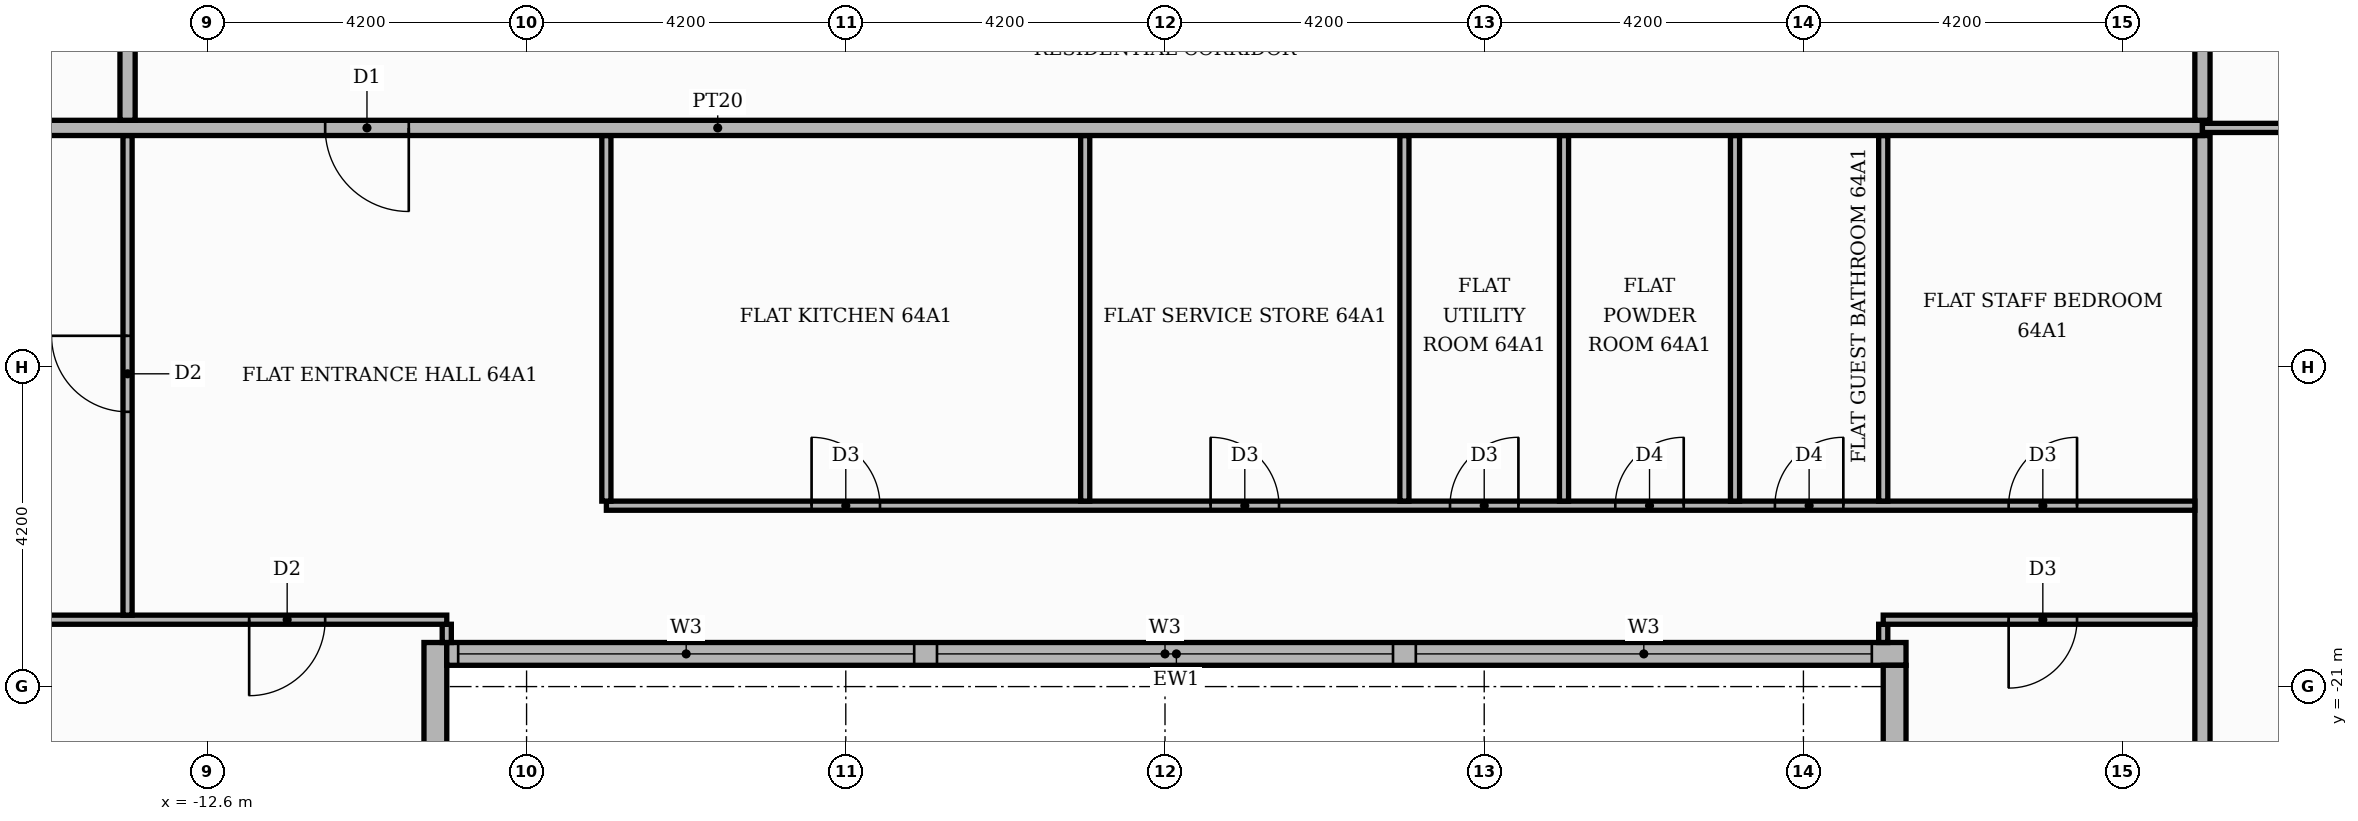
"""IFC4 building model, lengths in metres.
Left out: names, types, materials, properties, quantities, classifications, styles, units other than length and angle.
Written with IfcOpenShell. Run it as: python <this file> out.ifc"""

import sys

from ifc_helpers import new_model, si_unit, direction, frame, frame_2d, origin, place, context, subcontext, project, spatial, rectangle, extrude, element, fill, save


model = new_model("IFC4")
c1 = context("Model", 3, precision=1e-05, world=origin(), true_north=direction((0.0, 1.0)))
c2 = subcontext(c1, "Body", "Model", "MODEL_VIEW")
j1 = project(units=[si_unit("LENGTHUNIT", "METRE"), si_unit("PLANEANGLEUNIT", "RADIAN")], contexts=[c1])
p1 = place(None, origin())
s1 = spatial("IfcSite", under=j1, at=p1, CompositionType="ELEMENT")
p2 = place(p1, origin())
s2 = spatial("IfcBuilding", under=s1, at=p2, CompositionType="ELEMENT")
p3 = place(p2, frame((0.0, 0.0, 267.9)))
s3 = spatial("IfcBuildingStorey", under=s2, at=p3, CompositionType="ELEMENT", Elevation=267.9)
p4 = place(p3, frame((-9.6, -25.42, 0.0), z_axis=(0.0, 0.0, 1.0), x_axis=(0.0, 1.0, 0.0)))
e1 = element("IfcWall", 1, at=p4, inside=s3, PredefinedType="STANDARD", context=c2, shape_type="SweptSolid", body=[
    extrude(rectangle(XDim=5.0, YDim=0.3, at=frame_2d((2.5, 0.0))), origin(), (0.0, 0.0, 1.0), 3.48),
])
p5 = place(p4, frame((1.42, 0.0, 0.9)))
e2 = element("IfcOpeningElement", 2, at=p5, cuts=e1, PredefinedType="OPENING", context=c2, shape_type="SweptSolid", body=[
    extrude(rectangle(XDim=1.8, YDim=2.1, at=frame_2d((0.9, 1.05))), frame((0.0, 0.16, 0.0), z_axis=(0.0, -1.0, 0.0), x_axis=(1.0, 0.0, 0.0)), (0.0, 0.0, 1.0), 0.32),
])
p6 = place(p3, frame((-9.45, -20.57, 0.0), z_axis=(0.0, 0.0, 1.0), x_axis=(1.0, 0.0, 0.0)))
e3 = element("IfcWall", 3, at=p6, inside=s3, PredefinedType="STANDARD", context=c2, shape_type="SweptSolid", body=[
    extrude(rectangle(XDim=19.2, YDim=0.3, at=frame_2d((9.6, 0.0))), origin(), (0.0, 0.0, 1.0), 3.48),
])
p7 = place(p6, frame((0.15, 0.0, 0.9)))
e4 = element("IfcOpeningElement", 4, at=p7, cuts=e3, PredefinedType="OPENING", context=c2, shape_type="SweptSolid", body=[
    extrude(rectangle(XDim=6.0, YDim=2.1, at=frame_2d((3.0, 1.05))), frame((0.0, 0.16, 0.0), z_axis=(0.0, -1.0, 0.0), x_axis=(1.0, 0.0, 0.0)), (0.0, 0.0, 1.0), 0.32),
])
p8 = place(p6, frame((6.45, 0.0, 0.9)))
e5 = element("IfcOpeningElement", 5, at=p8, cuts=e3, PredefinedType="OPENING", context=c2, shape_type="SweptSolid", body=[
    extrude(rectangle(XDim=6.0, YDim=2.1, at=frame_2d((3.0, 1.05))), frame((0.0, 0.16, 0.0), z_axis=(0.0, -1.0, 0.0), x_axis=(1.0, 0.0, 0.0)), (0.0, 0.0, 1.0), 0.32),
])
p9 = place(p6, frame((12.75, 0.0, 0.9)))
e6 = element("IfcOpeningElement", 6, at=p9, cuts=e3, PredefinedType="OPENING", context=c2, shape_type="SweptSolid", body=[
    extrude(rectangle(XDim=6.0, YDim=2.1, at=frame_2d((3.0, 1.05))), frame((0.0, 0.16, 0.0), z_axis=(0.0, -1.0, 0.0), x_axis=(1.0, 0.0, 0.0)), (0.0, 0.0, 1.0), 0.32),
])
p10 = place(p3, frame((9.6, -20.72, 0.0), z_axis=(0.0, 0.0, 1.0), x_axis=(0.0, -1.0, 0.0)))
e7 = element("IfcWall", 7, at=p10, inside=s3, PredefinedType="STANDARD", context=c2, shape_type="SweptSolid", body=[
    extrude(rectangle(XDim=5.0, YDim=0.3, at=frame_2d((2.5, 0.0))), origin(), (0.0, 0.0, 1.0), 3.48),
])
p11 = place(p10, frame((1.48, 0.0, 0.9)))
e8 = element("IfcOpeningElement", 8, at=p11, cuts=e7, PredefinedType="OPENING", context=c2, shape_type="SweptSolid", body=[
    extrude(rectangle(XDim=1.8, YDim=2.1, at=frame_2d((0.9, 1.05))), frame((0.0, 0.16, 0.0), z_axis=(0.0, -1.0, 0.0), x_axis=(1.0, 0.0, 0.0)), (0.0, 0.0, 1.0), 0.32),
])
p12 = place(p3, frame((13.65, -25.42, 0.0), z_axis=(0.0, 0.0, 1.0), x_axis=(0.0, 1.0, 0.0)))
e9 = element("IfcWall", 9, at=p12, inside=s3, PredefinedType="PARTITIONING", context=c2, shape_type="SweptSolid", body=[
    extrude(rectangle(XDim=11.67, YDim=0.2, at=frame_2d((5.835, 0.0))), origin(), (0.0, 0.0, 1.0), 3.48),
])
for number, where, z_axis, x_axis in (
    (10, (-9.45, -20.42, 0.0), (0.0, 0.0, 1.0), (0.0, 1.0, 0.0)),
    (11, (9.45, -20.42, 0.0), (0.0, 0.0, 1.0), (0.0, 1.0, 0.0)),
):
    element("IfcWall", number, at=place(p3, frame(where, z_axis=z_axis, x_axis=x_axis)), inside=s3, PredefinedType="PARTITIONING", context=c2, shape_type="SweptSolid", body=[
        extrude(rectangle(XDim=0.24, YDim=0.12, at=frame_2d((0.12, 0.0))), origin(), (0.0, 0.0, 1.0), 3.48),
    ])
p13 = place(p3, frame((-20.719, -20.12, 0.0), z_axis=(0.0, 0.0, 1.0), x_axis=(1.0, 0.0, 0.0)))
e12 = element("IfcWall", 12, at=p13, inside=s3, PredefinedType="PARTITIONING", context=c2, shape_type="SweptSolid", body=[
    extrude(rectangle(XDim=11.269, YDim=0.12, at=frame_2d((5.635, 0.0))), origin(), (0.0, 0.0, 1.0), 3.48),
])
p14 = place(p13, frame((8.669, 0.0, 0.0)))
e13 = element("IfcOpeningElement", 13, at=p14, cuts=e12, PredefinedType="OPENING", context=c2, shape_type="SweptSolid", body=[
    extrude(rectangle(XDim=1.0, YDim=2.1, at=frame_2d((0.5, 1.05))), frame((0.0, 0.07, 0.0), z_axis=(0.0, -1.0, 0.0), x_axis=(1.0, 0.0, 0.0)), (0.0, 0.0, 1.0), 0.14),
])
p15 = place(p3, frame((9.45, -20.12, 0.0), z_axis=(0.0, 0.0, 1.0), x_axis=(1.0, 0.0, 0.0)))
e14 = element("IfcWall", 14, at=p15, inside=s3, PredefinedType="PARTITIONING", context=c2, shape_type="SweptSolid", body=[
    extrude(rectangle(XDim=4.1, YDim=0.12, at=frame_2d((2.05, 0.0))), origin(), (0.0, 0.0, 1.0), 3.48),
])
p16 = place(p15, frame((1.65, 0.0, 0.0)))
e15 = element("IfcOpeningElement", 15, at=p16, cuts=e14, PredefinedType="OPENING", context=c2, shape_type="SweptSolid", body=[
    extrude(rectangle(XDim=0.9, YDim=2.1, at=frame_2d((0.45, 1.05))), frame((0.0, 0.07, 0.0), z_axis=(0.0, -1.0, 0.0), x_axis=(1.0, 0.0, 0.0)), (0.0, 0.0, 1.0), 0.14),
])
p17 = place(p3, frame((-13.65, -20.06, 0.0), z_axis=(0.0, 0.0, 1.0), x_axis=(0.0, 1.0, 0.0)))
e16 = element("IfcWall", 16, at=p17, inside=s3, PredefinedType="PARTITIONING", context=c2, shape_type="SweptSolid", body=[
    extrude(rectangle(XDim=6.31, YDim=0.12, at=frame_2d((3.155, 0.0))), origin(), (0.0, 0.0, 1.0), 3.48),
])
p18 = place(p17, frame((2.675, 0.0, 0.0)))
e17 = element("IfcOpeningElement", 17, at=p18, cuts=e16, PredefinedType="OPENING", context=c2, shape_type="SweptSolid", body=[
    extrude(rectangle(XDim=1.0, YDim=2.1, at=frame_2d((0.5, 1.05))), frame((0.0, 0.07, 0.0), z_axis=(0.0, -1.0, 0.0), x_axis=(1.0, 0.0, 0.0)), (0.0, 0.0, 1.0), 0.14),
])
p19 = place(p3, frame((-7.35, -18.62, 0.0), z_axis=(0.0, 0.0, 1.0), x_axis=(1.0, 0.0, 0.0)))
e18 = element("IfcWall", 18, at=p19, inside=s3, PredefinedType="PARTITIONING", context=c2, shape_type="SweptSolid", body=[
    extrude(rectangle(XDim=20.9, YDim=0.12, at=frame_2d((10.45, 0.0))), origin(), (0.0, 0.0, 1.0), 3.48),
])
p20 = place(p19, frame((2.7, 0.0, 0.0)))
e19 = element("IfcOpeningElement", 19, at=p20, cuts=e18, PredefinedType="OPENING", context=c2, shape_type="SweptSolid", body=[
    extrude(rectangle(XDim=0.9, YDim=2.1, at=frame_2d((0.45, 1.05))), frame((0.0, 0.07, 0.0), z_axis=(0.0, -1.0, 0.0), x_axis=(1.0, 0.0, 0.0)), (0.0, 0.0, 1.0), 0.14),
])
p21 = place(p19, frame((7.95, 0.0, 0.0)))
e20 = element("IfcOpeningElement", 20, at=p21, cuts=e18, PredefinedType="OPENING", context=c2, shape_type="SweptSolid", body=[
    extrude(rectangle(XDim=0.9, YDim=2.1, at=frame_2d((0.45, 1.05))), frame((0.0, 0.07, 0.0), z_axis=(0.0, -1.0, 0.0), x_axis=(1.0, 0.0, 0.0)), (0.0, 0.0, 1.0), 0.14),
])
p22 = place(p19, frame((11.1, 0.0, 0.0)))
e21 = element("IfcOpeningElement", 21, at=p22, cuts=e18, PredefinedType="OPENING", context=c2, shape_type="SweptSolid", body=[
    extrude(rectangle(XDim=0.9, YDim=2.1, at=frame_2d((0.45, 1.05))), frame((0.0, 0.07, 0.0), z_axis=(0.0, -1.0, 0.0), x_axis=(1.0, 0.0, 0.0)), (0.0, 0.0, 1.0), 0.14),
])
p23 = place(p19, frame((13.275, 0.0, 0.0)))
e22 = element("IfcOpeningElement", 22, at=p23, cuts=e18, PredefinedType="OPENING", context=c2, shape_type="SweptSolid", body=[
    extrude(rectangle(XDim=0.9, YDim=2.1, at=frame_2d((0.45, 1.05))), frame((0.0, 0.07, 0.0), z_axis=(0.0, -1.0, 0.0), x_axis=(1.0, 0.0, 0.0)), (0.0, 0.0, 1.0), 0.14),
])
p24 = place(p19, frame((15.375, 0.0, 0.0)))
e23 = element("IfcOpeningElement", 23, at=p24, cuts=e18, PredefinedType="OPENING", context=c2, shape_type="SweptSolid", body=[
    extrude(rectangle(XDim=0.9, YDim=2.1, at=frame_2d((0.45, 1.05))), frame((0.0, 0.07, 0.0), z_axis=(0.0, -1.0, 0.0), x_axis=(1.0, 0.0, 0.0)), (0.0, 0.0, 1.0), 0.14),
])
p25 = place(p19, frame((18.45, 0.0, 0.0)))
e24 = element("IfcOpeningElement", 24, at=p25, cuts=e18, PredefinedType="OPENING", context=c2, shape_type="SweptSolid", body=[
    extrude(rectangle(XDim=0.9, YDim=2.1, at=frame_2d((0.45, 1.05))), frame((0.0, 0.07, 0.0), z_axis=(0.0, -1.0, 0.0), x_axis=(1.0, 0.0, 0.0)), (0.0, 0.0, 1.0), 0.14),
])
for number, where, z_axis, x_axis in (
    (25, (-7.35, -18.56, 0.0), (0.0, 0.0, 1.0), (0.0, 1.0, 0.0)),
    (26, (-1.05, -18.56, 0.0), (0.0, 0.0, 1.0), (0.0, 1.0, 0.0)),
    (27, (3.15, -18.56, 0.0), (0.0, 0.0, 1.0), (0.0, 1.0, 0.0)),
    (28, (5.25, -18.56, 0.0), (0.0, 0.0, 1.0), (0.0, 1.0, 0.0)),
    (29, (7.5, -18.56, 0.0), (0.0, 0.0, 1.0), (0.0, 1.0, 0.0)),
    (30, (9.45, -18.56, 0.0), (0.0, 0.0, 1.0), (0.0, 1.0, 0.0)),
):
    element("IfcWall", number, at=place(p3, frame(where, z_axis=z_axis, x_axis=x_axis)), inside=s3, PredefinedType="PARTITIONING", context=c2, shape_type="SweptSolid", body=[
        extrude(rectangle(XDim=4.81, YDim=0.12, at=frame_2d((2.405, 0.0))), origin(), (0.0, 0.0, 1.0), 3.48),
    ])
p26 = place(p3, frame((-25.42, -13.65, 0.0), z_axis=(0.0, 0.0, 1.0), x_axis=(1.0, 0.0, 0.0)))
e31 = element("IfcWall", 31, at=p26, inside=s3, PredefinedType="PARTITIONING", context=c2, shape_type="SweptSolid", body=[
    extrude(rectangle(XDim=39.07, YDim=0.2, at=frame_2d((19.535, 0.0))), origin(), (0.0, 0.0, 1.0), 3.48),
])
p27 = place(p26, frame((14.37, 0.0, 0.0)))
e32 = element("IfcOpeningElement", 32, at=p27, cuts=e31, PredefinedType="OPENING", context=c2, shape_type="SweptSolid", body=[
    extrude(rectangle(XDim=1.1, YDim=2.4, at=frame_2d((0.55, 1.2))), frame((0.0, 0.11, 0.0), z_axis=(0.0, -1.0, 0.0), x_axis=(1.0, 0.0, 0.0)), (0.0, 0.0, 1.0), 0.22),
])
p28 = place(p3, frame((13.65, -13.65, 0.0), z_axis=(0.0, 0.0, 1.0), x_axis=(1.0, 0.0, 0.0)))
e33 = element("IfcWall", 33, at=p28, inside=s3, PredefinedType="PARTITIONING", context=c2, shape_type="SweptSolid", body=[
    extrude(rectangle(XDim=6.17, YDim=0.12, at=frame_2d((3.085, 0.0))), origin(), (0.0, 0.0, 1.0), 3.48),
])
p29 = place(p28, frame((2.635, 0.0, 0.0)))
e34 = element("IfcOpeningElement", 34, at=p29, cuts=e33, PredefinedType="OPENING", context=c2, shape_type="SweptSolid", body=[
    extrude(rectangle(XDim=0.9, YDim=2.1, at=frame_2d((0.45, 1.05))), frame((0.0, 0.07, 0.0), z_axis=(0.0, -1.0, 0.0), x_axis=(1.0, 0.0, 0.0)), (0.0, 0.0, 1.0), 0.14),
])
for number, where, z_axis, x_axis in (
    (35, (-13.65, -13.55, 0.0), (0.0, 0.0, 1.0), (0.0, 1.0, 0.0)),
    (36, (13.65, -13.55, 0.0), (0.0, 0.0, 1.0), (0.0, 1.0, 0.0)),
):
    element("IfcWall", number, at=place(p3, frame(where, z_axis=z_axis, x_axis=x_axis)), inside=s3, PredefinedType="PARTITIONING", context=c2, shape_type="SweptSolid", body=[
        extrude(rectangle(XDim=2.45, YDim=0.2, at=frame_2d((1.225, 0.0))), origin(), (0.0, 0.0, 1.0), 3.48),
    ])
p30 = place(p7, origin())
e37 = element("IfcWindow", 37, at=p30, inside=s3, PartitioningType="SINGLE_PANEL", PredefinedType="WINDOW", context=c2, shape_type="SweptSolid", body=[
    extrude(rectangle(XDim=6.0, YDim=2.1, at=frame_2d((3.0, 1.05))), frame((0.0, 0.03, 0.0), z_axis=(0.0, -1.0, 0.0), x_axis=(1.0, 0.0, 0.0)), (0.0, 0.0, 1.0), 0.06),
])
fill(e4, e37)
p31 = place(p8, origin())
e38 = element("IfcWindow", 38, at=p31, inside=s3, PartitioningType="SINGLE_PANEL", PredefinedType="WINDOW", context=c2, shape_type="SweptSolid", body=[
    extrude(rectangle(XDim=6.0, YDim=2.1, at=frame_2d((3.0, 1.05))), frame((0.0, 0.03, 0.0), z_axis=(0.0, -1.0, 0.0), x_axis=(1.0, 0.0, 0.0)), (0.0, 0.0, 1.0), 0.06),
])
fill(e5, e38)
p32 = place(p9, origin())
e39 = element("IfcWindow", 39, at=p32, inside=s3, PartitioningType="SINGLE_PANEL", PredefinedType="WINDOW", context=c2, shape_type="SweptSolid", body=[
    extrude(rectangle(XDim=6.0, YDim=2.1, at=frame_2d((3.0, 1.05))), frame((0.0, 0.03, 0.0), z_axis=(0.0, -1.0, 0.0), x_axis=(1.0, 0.0, 0.0)), (0.0, 0.0, 1.0), 0.06),
])
fill(e6, e39)
p33 = place(p27, frame((1.1, 0.0, 0.0), z_axis=(0.0, 0.0, 1.0), x_axis=(-1.0, 0.0, 0.0)))
e40 = element("IfcDoor", 40, at=p33, inside=s3, OperationType="SINGLE_SWING_RIGHT", PredefinedType="DOOR", context=c2, shape_type="SweptSolid", body=[
    extrude(rectangle(XDim=1.1, YDim=2.4, at=frame_2d((0.55, 1.2))), frame((0.0, 0.025, 0.0), z_axis=(0.0, -1.0, 0.0), x_axis=(1.0, 0.0, 0.0)), (0.0, 0.0, 1.0), 0.05),
])
fill(e32, e40)
p34 = place(p18, origin())
e41 = element("IfcDoor", 41, at=p34, inside=s3, OperationType="SINGLE_SWING_RIGHT", PredefinedType="DOOR", context=c2, shape_type="SweptSolid", body=[
    extrude(rectangle(XDim=1.0, YDim=2.1, at=frame_2d((0.5, 1.05))), frame((0.0, 0.025, 0.0), z_axis=(0.0, -1.0, 0.0), x_axis=(1.0, 0.0, 0.0)), (0.0, 0.0, 1.0), 0.05),
])
fill(e17, e41)
p35 = place(p20, origin())
e42 = element("IfcDoor", 42, at=p35, inside=s3, OperationType="SINGLE_SWING_LEFT", PredefinedType="DOOR", context=c2, shape_type="SweptSolid", body=[
    extrude(rectangle(XDim=0.9, YDim=2.1, at=frame_2d((0.45, 1.05))), frame((0.0, 0.025, 0.0), z_axis=(0.0, -1.0, 0.0), x_axis=(1.0, 0.0, 0.0)), (0.0, 0.0, 1.0), 0.05),
])
fill(e19, e42)
p36 = place(p21, origin())
e43 = element("IfcDoor", 43, at=p36, inside=s3, OperationType="SINGLE_SWING_LEFT", PredefinedType="DOOR", context=c2, shape_type="SweptSolid", body=[
    extrude(rectangle(XDim=0.9, YDim=2.1, at=frame_2d((0.45, 1.05))), frame((0.0, 0.025, 0.0), z_axis=(0.0, -1.0, 0.0), x_axis=(1.0, 0.0, 0.0)), (0.0, 0.0, 1.0), 0.05),
])
fill(e20, e43)
p37 = place(p22, origin())
e44 = element("IfcDoor", 44, at=p37, inside=s3, OperationType="SINGLE_SWING_RIGHT", PredefinedType="DOOR", context=c2, shape_type="SweptSolid", body=[
    extrude(rectangle(XDim=0.9, YDim=2.1, at=frame_2d((0.45, 1.05))), frame((0.0, 0.025, 0.0), z_axis=(0.0, -1.0, 0.0), x_axis=(1.0, 0.0, 0.0)), (0.0, 0.0, 1.0), 0.05),
])
fill(e21, e44)
p38 = place(p23, origin())
e45 = element("IfcDoor", 45, at=p38, inside=s3, OperationType="SINGLE_SWING_RIGHT", PredefinedType="DOOR", context=c2, shape_type="SweptSolid", body=[
    extrude(rectangle(XDim=0.9, YDim=2.1, at=frame_2d((0.45, 1.05))), frame((0.0, 0.025, 0.0), z_axis=(0.0, -1.0, 0.0), x_axis=(1.0, 0.0, 0.0)), (0.0, 0.0, 1.0), 0.05),
])
fill(e22, e45)
p39 = place(p24, origin())
e46 = element("IfcDoor", 46, at=p39, inside=s3, OperationType="SINGLE_SWING_RIGHT", PredefinedType="DOOR", context=c2, shape_type="SweptSolid", body=[
    extrude(rectangle(XDim=0.9, YDim=2.1, at=frame_2d((0.45, 1.05))), frame((0.0, 0.025, 0.0), z_axis=(0.0, -1.0, 0.0), x_axis=(1.0, 0.0, 0.0)), (0.0, 0.0, 1.0), 0.05),
])
fill(e23, e46)
p40 = place(p25, origin())
e47 = element("IfcDoor", 47, at=p40, inside=s3, OperationType="SINGLE_SWING_RIGHT", PredefinedType="DOOR", context=c2, shape_type="SweptSolid", body=[
    extrude(rectangle(XDim=0.9, YDim=2.1, at=frame_2d((0.45, 1.05))), frame((0.0, 0.025, 0.0), z_axis=(0.0, -1.0, 0.0), x_axis=(1.0, 0.0, 0.0)), (0.0, 0.0, 1.0), 0.05),
])
fill(e24, e47)
p41 = place(p14, frame((1.0, 0.0, 0.0), z_axis=(0.0, 0.0, 1.0), x_axis=(-1.0, 0.0, 0.0)))
e48 = element("IfcDoor", 48, at=p41, inside=s3, OperationType="SINGLE_SWING_LEFT", PredefinedType="DOOR", context=c2, shape_type="SweptSolid", body=[
    extrude(rectangle(XDim=1.0, YDim=2.1, at=frame_2d((0.5, 1.05))), frame((0.0, 0.025, 0.0), z_axis=(0.0, -1.0, 0.0), x_axis=(1.0, 0.0, 0.0)), (0.0, 0.0, 1.0), 0.05),
])
fill(e13, e48)
p42 = place(p16, frame((0.9, 0.0, 0.0), z_axis=(0.0, 0.0, 1.0), x_axis=(-1.0, 0.0, 0.0)))
e49 = element("IfcDoor", 49, at=p42, inside=s3, OperationType="SINGLE_SWING_LEFT", PredefinedType="DOOR", context=c2, shape_type="SweptSolid", body=[
    extrude(rectangle(XDim=0.9, YDim=2.1, at=frame_2d((0.45, 1.05))), frame((0.0, 0.025, 0.0), z_axis=(0.0, -1.0, 0.0), x_axis=(1.0, 0.0, 0.0)), (0.0, 0.0, 1.0), 0.05),
])
fill(e15, e49)
save(model, sys.argv[1])
